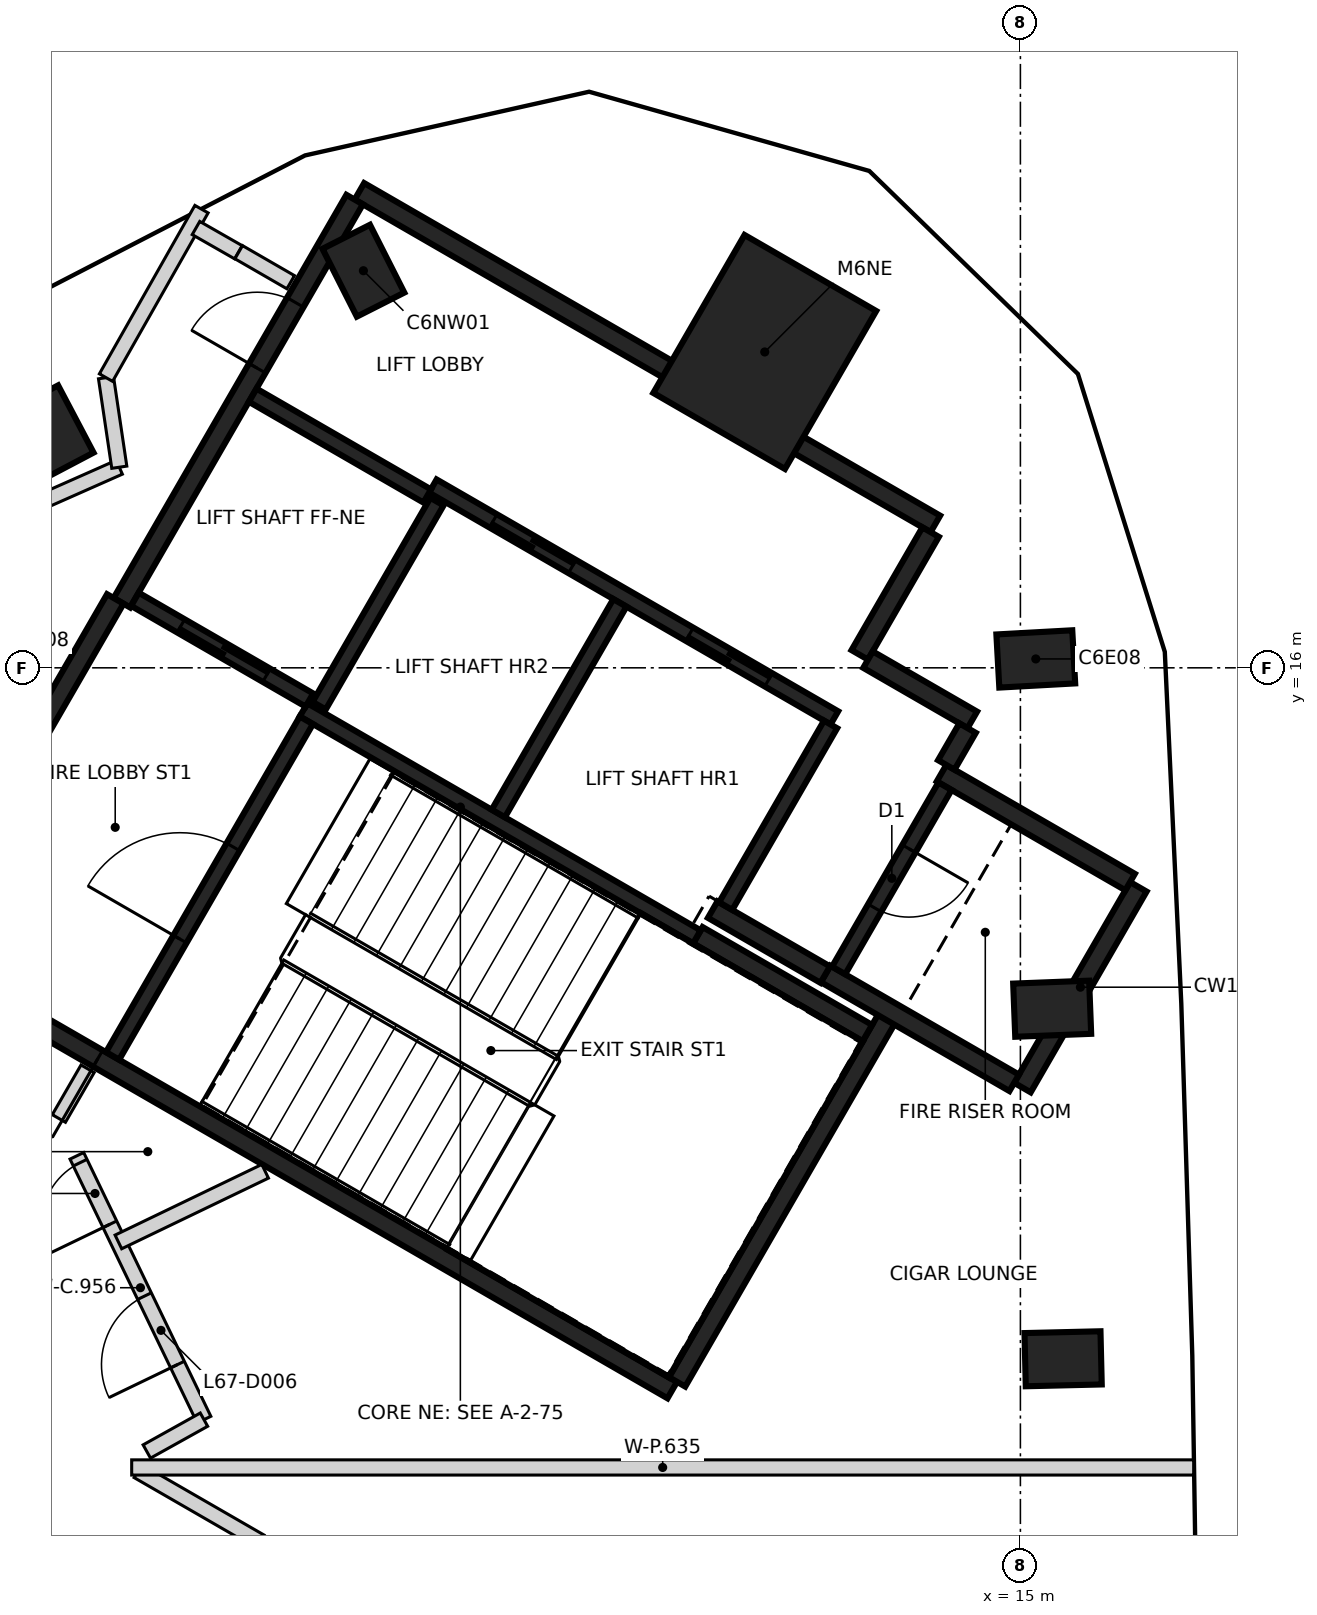
"""IFC4 building model, lengths in metres.
Left out: names, types, materials, properties, quantities, classifications, styles, units other than length and angle.
Written with IfcOpenShell. Run it as: python <this file> out.ifc"""

import sys

from ifc_helpers import new_model, si_unit, direction, frame, frame_2d, origin, origin_2d, place, context, subcontext, project, spatial, rectangle, extrude, element, fill, save


model = new_model("IFC4")
c1 = context("Model", 3, precision=1e-05, world=origin(), true_north=direction((0.0, 1.0)))
c2 = subcontext(c1, "Body", "Model", "MODEL_VIEW")
j1 = project(units=[si_unit("LENGTHUNIT", "METRE"), si_unit("PLANEANGLEUNIT", "RADIAN")], contexts=[c1])
p1 = place(None, origin())
s1 = spatial("IfcSite", under=j1, at=p1, CompositionType="ELEMENT")
p2 = place(p1, origin())
s2 = spatial("IfcBuilding", under=s1, at=p2, CompositionType="ELEMENT")
p3 = place(p2, frame((0.0, 0.0, 265.8)))
s3 = spatial("IfcBuildingStorey", under=s2, at=p3, CompositionType="ELEMENT", Elevation=265.8)
for number, where, z_axis, x_axis in (
    (1, (15.562, 6.91, -0.35), (0.0, 0.0, 1.0), (1.0, 0.024, 0.0)),
    (2, (15.418, 11.515, -0.35), (0.0, 0.0, 1.0), (0.999, 0.039, 0.0)),
    (3, (15.202, 16.117, -0.35), (0.0, 0.0, 1.0), (0.998, 0.055, 0.0)),
    (4, (6.356, 21.224, -0.35), (0.0, 0.0, 1.0), (-0.452, 0.892, 0.0)),
    (5, (2.263, 19.11, -0.35), (0.0, 0.0, 1.0), (-0.466, 0.885, 0.0)),
):
    element("IfcColumn", number, at=place(p3, frame(where, z_axis=z_axis, x_axis=x_axis)), inside=s3, PredefinedType="COLUMN", context=c2, shape_type="SweptSolid", body=[
        extrude(rectangle(XDim=1.0, YDim=0.7, at=origin_2d()), origin(), (0.0, 0.0, 1.0), 3.6),
    ])
p4 = place(p3, frame((11.637, 20.155, -0.35), z_axis=(0.0, 0.0, 1.0), x_axis=(0.5, 0.866025403784, 0.0)))
e6 = element("IfcColumn", 6, at=p4, inside=s3, PredefinedType="COLUMN", context=c2, shape_type="SweptSolid", body=[
    extrude(rectangle(XDim=2.4, YDim=2.0, at=origin_2d()), origin(), (0.0, 0.0, 1.0), 3.6),
])
p5 = place(p3, frame((10.42, 6.498, 0.0), z_axis=(0.0, 0.0, 1.0), x_axis=(-0.866021906294, 0.500006057782, 0.0)))
e7 = element("IfcWall", 7, at=p5, inside=s3, PredefinedType="SHEAR", context=c2, shape_type="SweptSolid", body=[
    extrude(rectangle(XDim=11.55, YDim=0.25, at=frame_2d((5.775, 0.0))), origin(), (0.0, 0.0, 1.0), 3.25),
])
p6 = place(p5, frame((10.025, 0.0, 0.0)))
e8 = element("IfcOpeningElement", 8, at=p6, cuts=e7, PredefinedType="OPENING", context=c2, shape_type="SweptSolid", body=[
    extrude(rectangle(XDim=1.2, YDim=2.1, at=frame_2d((0.6, 1.05))), frame((0.0, 0.135, 0.0), z_axis=(0.0, -1.0, 0.0), x_axis=(1.0, 0.0, 0.0)), (0.0, 0.0, 1.0), 0.27),
])
p7 = place(p5, frame((8.725, 0.0, 0.0)))
e9 = element("IfcOpeningElement", 9, at=p7, cuts=e7, PredefinedType="OPENING", context=c2, shape_type="SweptSolid", body=[
    extrude(rectangle(XDim=1.2, YDim=2.1, at=frame_2d((0.6, 1.05))), frame((0.0, 0.135, 0.0), z_axis=(0.0, -1.0, 0.0), x_axis=(1.0, 0.0, 0.0)), (0.0, 0.0, 1.0), 0.27),
])
p8 = place(p3, frame((6.304, 22.269, 0.0), z_axis=(0.0, 0.0, 1.0), x_axis=(0.866022959057, -0.500004234368, 0.0)))
e10 = element("IfcWall", 10, at=p8, inside=s3, PredefinedType="SHEAR", context=c2, shape_type="SweptSolid", body=[
    extrude(rectangle(XDim=8.75, YDim=0.25, at=frame_2d((4.375, 0.0))), origin(), (0.0, 0.0, 1.0), 3.25),
])
p9 = place(p3, frame((3.179, 16.856, 0.0), z_axis=(0.0, 0.0, 1.0), x_axis=(0.500001955336, 0.866024274868, 0.0)))
e11 = element("IfcWall", 11, at=p9, inside=s3, PredefinedType="SHEAR", context=c2, shape_type="SweptSolid", body=[
    extrude(rectangle(XDim=6.125, YDim=0.25, at=frame_2d((3.062, 0.0))), origin(), (0.0, 0.0, 1.0), 3.25),
])
p10 = place(p9, frame((3.563, 0.0, 0.0)))
e12 = element("IfcOpeningElement", 12, at=p10, cuts=e11, PredefinedType="OPENING", context=c2, shape_type="SweptSolid", body=[
    extrude(rectangle(XDim=1.0, YDim=2.1, at=frame_2d((0.5, 1.05))), frame((0.0, 0.135, 0.0), z_axis=(0.0, -1.0, 0.0), x_axis=(1.0, 0.0, 0.0)), (0.0, 0.0, 1.0), 0.27),
])
p11 = place(p3, frame((0.48, 12.381, 0.0), z_axis=(0.0, 0.0, 1.0), x_axis=(0.49999885962, 0.866026062182, 0.0)))
e13 = element("IfcWall", 13, at=p11, inside=s3, PredefinedType="SHEAR", context=c2, shape_type="SweptSolid", body=[
    extrude(rectangle(XDim=5.225, YDim=0.25, at=frame_2d((2.612, 0.0))), origin(), (0.0, 0.0, 1.0), 3.25),
])
p12 = place(p3, frame((13.238, 11.378, 0.0), z_axis=(0.0, 0.0, 1.0), x_axis=(-0.500008851346, -0.866020293397, 0.0)))
e14 = element("IfcWall", 14, at=p12, inside=s3, PredefinedType="SHEAR", context=c2, shape_type="SweptSolid", body=[
    extrude(rectangle(XDim=5.51, YDim=0.25, at=frame_2d((2.755, 0.0))), origin(), (0.0, 0.0, 1.0), 3.25),
])
p13 = place(p3, frame((16.552, 13.119, 0.0), z_axis=(0.0, 0.0, 1.0), x_axis=(-0.499978833458, -0.866037623948, 0.0)))
e15 = element("IfcWall", 15, at=p13, inside=s3, PredefinedType="SHEAR", context=c2, shape_type="SweptSolid", body=[
    extrude(rectangle(XDim=3.05, YDim=0.25, at=frame_2d((1.525, 0.0))), origin(), (0.0, 0.0, 1.0), 3.25),
])
p14 = place(p3, frame((14.918, 10.54, 0.0), z_axis=(0.0, 0.0, 1.0), x_axis=(-0.866063538972, 0.499933942099, 0.0)))
e16 = element("IfcWall", 16, at=p14, inside=s3, PredefinedType="SHEAR", context=c2, shape_type="SweptSolid", body=[
    extrude(rectangle(XDim=2.865, YDim=0.25, at=frame_2d((1.432, 0.0))), origin(), (0.0, 0.0, 1.0), 3.25),
])
p15 = place(p3, frame((13.963, 14.614, 0.0), z_axis=(0.0, 0.0, 1.0), x_axis=(0.866042235819, -0.499970844928, 0.0)))
e17 = element("IfcWall", 17, at=p15, inside=s3, PredefinedType="SHEAR", context=c2, shape_type="SweptSolid", body=[
    extrude(rectangle(XDim=2.865, YDim=0.25, at=frame_2d((1.432, 0.0))), origin(), (0.0, 0.0, 1.0), 3.25),
])
p16 = place(p3, frame((10.757, 12.481, 0.0), z_axis=(0.0, 0.0, 1.0), x_axis=(0.866022940537, -0.500004266446, 0.0)))
e18 = element("IfcWall", 18, at=p16, inside=s3, PredefinedType="SHEAR", context=c2, shape_type="SweptSolid", body=[
    extrude(rectangle(XDim=2.575, YDim=0.25, at=frame_2d((1.287, 0.0))), origin(), (0.0, 0.0, 1.0), 3.25),
])
p17 = place(p3, frame((13.819, 17.785, 0.0), z_axis=(0.0, 0.0, 1.0), x_axis=(-0.500039802285, -0.866002422705, 0.0)))
e19 = element("IfcWall", 19, at=p17, inside=s3, PredefinedType="SHEAR", context=c2, shape_type="SweptSolid", body=[
    extrude(rectangle(XDim=1.865, YDim=0.25, at=frame_2d((0.932, 0.0))), origin(), (0.0, 0.0, 1.0), 3.25),
])
p18 = place(p3, frame((12.433, 11.964, 0.0), z_axis=(0.0, 0.0, 1.0), x_axis=(-0.866038183914, 0.499977863513, 0.0)))
e20 = element("IfcWall", 20, at=p18, inside=s3, PredefinedType="SHEAR", context=c2, shape_type="SweptSolid", body=[
    extrude(rectangle(XDim=1.71, YDim=0.25, at=frame_2d((0.855, 0.0))), origin(), (0.0, 0.0, 1.0), 3.25),
])
p19 = place(p3, frame((12.995, 16.108, 0.0), z_axis=(0.0, 0.0, 1.0), x_axis=(0.866044474677, -0.49996696679, 0.0)))
e21 = element("IfcWall", 21, at=p19, inside=s3, PredefinedType="SHEAR", context=c2, shape_type="SweptSolid", body=[
    extrude(rectangle(XDim=1.584, YDim=0.25, at=frame_2d((0.792, 0.0))), origin(), (0.0, 0.0, 1.0), 3.25),
])
p20 = place(p3, frame((14.305, 15.207, 0.0), z_axis=(0.0, 0.0, 1.0), x_axis=(-0.499848422343, -0.866112899501, 0.0)))
e22 = element("IfcWall", 22, at=p20, inside=s3, PredefinedType="SHEAR", context=c2, shape_type="SweptSolid", body=[
    extrude(rectangle(XDim=0.559, YDim=0.25, at=frame_2d((0.28, 0.0))), origin(), (0.0, 0.0, 1.0), 3.25),
])
p21 = place(p3, frame((12.552, 15.342, 0.0), z_axis=(0.0, 0.0, 1.0), x_axis=(-0.866030299012, 0.499991521122, 0.0)))
e23 = element("IfcWall", 23, at=p21, inside=s3, PredefinedType="SHEAR", context=c2, shape_type="SweptSolid", body=[
    extrude(rectangle(XDim=6.1, YDim=0.2, at=frame_2d((3.05, 0.0))), origin(), (0.0, 0.0, 1.0), 3.25),
])
p22 = place(p21, frame((1.0, 0.0, 0.0)))
e24 = element("IfcOpeningElement", 24, at=p22, cuts=e23, PredefinedType="OPENING", context=c2, shape_type="SweptSolid", body=[
    extrude(rectangle(XDim=1.2, YDim=2.1, at=frame_2d((0.6, 1.05))), frame((0.0, 0.11, 0.0), z_axis=(0.0, -1.0, 0.0), x_axis=(1.0, 0.0, 0.0)), (0.0, 0.0, 1.0), 0.22),
])
p23 = place(p21, frame((3.982, 0.0, 0.0)))
e25 = element("IfcOpeningElement", 25, at=p23, cuts=e23, PredefinedType="OPENING", context=c2, shape_type="SweptSolid", body=[
    extrude(rectangle(XDim=1.2, YDim=2.1, at=frame_2d((0.6, 1.05))), frame((0.0, 0.11, 0.0), z_axis=(0.0, -1.0, 0.0), x_axis=(1.0, 0.0, 0.0)), (0.0, 0.0, 1.0), 0.22),
])
p24 = place(p3, frame((10.743, 12.46, 0.0), z_axis=(0.0, 0.0, 1.0), x_axis=(-0.866018848283, 0.500011354289, 0.0)))
e26 = element("IfcWall", 26, at=p24, inside=s3, PredefinedType="SHEAR", context=c2, shape_type="SweptSolid", body=[
    extrude(rectangle(XDim=5.974, YDim=0.2, at=frame_2d((2.987, 0.0))), origin(), (0.0, 0.0, 1.0), 3.25),
])
p25 = place(p3, frame((3.057, 10.895, 0.0), z_axis=(0.0, 0.0, 1.0), x_axis=(0.500027839223, 0.866009330205, 0.0)))
e27 = element("IfcWall", 27, at=p25, inside=s3, PredefinedType="SHEAR", context=c2, shape_type="SweptSolid", body=[
    extrude(rectangle(XDim=5.098, YDim=0.2, at=frame_2d((2.549, 0.0))), origin(), (0.0, 0.0, 1.0), 3.25),
])
p26 = place(p25, frame((1.774, 0.0, 0.0)))
e28 = element("IfcOpeningElement", 28, at=p26, cuts=e27, PredefinedType="OPENING", context=c2, shape_type="SweptSolid", body=[
    extrude(rectangle(XDim=1.4, YDim=2.1, at=frame_2d((0.7, 1.05))), frame((0.0, 0.11, 0.0), z_axis=(0.0, -1.0, 0.0), x_axis=(1.0, 0.0, 0.0)), (0.0, 0.0, 1.0), 0.22),
])
p27 = place(p3, frame((8.132, 14.084, 0.0), z_axis=(0.0, 0.0, 1.0), x_axis=(0.500030834389, 0.86600760081, 0.0)))
e29 = element("IfcWall", 29, at=p27, inside=s3, PredefinedType="SHEAR", context=c2, shape_type="SweptSolid", body=[
    extrude(rectangle(XDim=3.198, YDim=0.2, at=frame_2d((1.599, 0.0))), origin(), (0.0, 0.0, 1.0), 3.25),
])
p28 = place(p3, frame((14.008, 14.442, 0.0), z_axis=(0.0, 0.0, 1.0), x_axis=(-0.499986818241, -0.866033014143, 0.0)))
e30 = element("IfcWall", 30, at=p28, inside=s3, PredefinedType="SHEAR", context=c2, shape_type="SweptSolid", body=[
    extrude(rectangle(XDim=2.798, YDim=0.2, at=frame_2d((1.399, 0.0))), origin(), (0.0, 0.0, 1.0), 3.25),
])
p29 = place(p28, frame((0.949, 0.0, 0.0)))
e31 = element("IfcOpeningElement", 31, at=p29, cuts=e30, PredefinedType="OPENING", context=c2, shape_type="SweptSolid", body=[
    extrude(rectangle(XDim=0.9, YDim=2.1, at=frame_2d((0.45, 1.05))), frame((0.0, 0.11, 0.0), z_axis=(0.0, -1.0, 0.0), x_axis=(1.0, 0.0, 0.0)), (0.0, 0.0, 1.0), 0.22),
])
p30 = place(p3, frame((12.502, 15.255, 0.0), z_axis=(0.0, 0.0, 1.0), x_axis=(-0.499965018551, -0.866045599391, 0.0)))
e32 = element("IfcWall", 32, at=p30, inside=s3, PredefinedType="SHEAR", context=c2, shape_type="SweptSolid", body=[
    extrude(rectangle(XDim=2.759, YDim=0.2, at=frame_2d((1.379, 0.0))), origin(), (0.0, 0.0, 1.0), 3.25),
])
p31 = place(p3, frame((7.324, 18.187, 0.0), z_axis=(0.0, 0.0, 1.0), x_axis=(-0.499967891604, -0.866043940782, 0.0)))
e33 = element("IfcWall", 33, at=p31, inside=s3, PredefinedType="SHEAR", context=c2, shape_type="SweptSolid", body=[
    extrude(rectangle(XDim=3.1, YDim=0.2, at=frame_2d((1.55, 0.0))), origin(), (0.0, 0.0, 1.0), 3.25),
])
p32 = place(p3, frame((5.646, 15.576, 0.0), z_axis=(0.0, 0.0, 1.0), x_axis=(-0.866018407898, 0.500012117035, 0.0)))
e34 = element("IfcWall", 34, at=p32, inside=s3, PredefinedType="SHEAR", context=c2, shape_type="SweptSolid", body=[
    extrude(rectangle(XDim=2.651, YDim=0.2, at=frame_2d((1.325, 0.0))), origin(), (0.0, 0.0, 1.0), 3.25),
])
p33 = place(p32, frame((0.652, 0.0, 0.0)))
e35 = element("IfcOpeningElement", 35, at=p33, cuts=e34, PredefinedType="OPENING", context=c2, shape_type="SweptSolid", body=[
    extrude(rectangle(XDim=1.3, YDim=2.1, at=frame_2d((0.65, 1.05))), frame((0.0, 0.11, 0.0), z_axis=(0.0, -1.0, 0.0), x_axis=(1.0, 0.0, 0.0)), (0.0, 0.0, 1.0), 0.22),
])
p34 = place(p3, frame((7.196, 18.26, 0.0), z_axis=(0.0, 0.0, 1.0), x_axis=(-0.866018407898, 0.500012117035, 0.0)))
e36 = element("IfcWall", 36, at=p34, inside=s3, PredefinedType="SHEAR", context=c2, shape_type="SweptSolid", body=[
    extrude(rectangle(XDim=2.651, YDim=0.2, at=frame_2d((1.325, 0.0))), origin(), (0.0, 0.0, 1.0), 3.25),
])
p35 = place(p3, frame((2.021, 18.141, 0.0), z_axis=(0.0, 0.0, 1.0), x_axis=(0.914343087003, 0.404940389748, 0.0)))
e37 = element("IfcWall", 37, at=p35, inside=s3, PredefinedType="PARTITIONING", context=c2, shape_type="SweptSolid", body=[
    extrude(rectangle(XDim=1.229, YDim=0.2, at=frame_2d((0.615, 0.0))), origin(), (0.0, 0.0, 1.0), 3.25),
])
p36 = place(p3, frame((2.35, 10.071, 0.0), z_axis=(0.0, 0.0, 1.0), x_axis=(0.500309905322, 0.865846405916, 0.0)))
e38 = element("IfcWall", 38, at=p36, inside=s3, PredefinedType="PARTITIONING", context=c2, shape_type="SweptSolid", body=[
    extrude(rectangle(XDim=0.755, YDim=0.2, at=frame_2d((0.378, 0.0))), origin(), (0.0, 0.0, 1.0), 3.25),
])
p37 = place(p3, frame((4.26, 6.109, 0.0), z_axis=(0.0, 0.0, 1.0), x_axis=(-0.434189007872, 0.900821794498, 0.0)))
e39 = element("IfcWall", 39, at=p37, inside=s3, PredefinedType="PARTITIONING", context=c2, shape_type="SweptSolid", body=[
    extrude(rectangle(XDim=3.853, YDim=0.2, at=frame_2d((1.926, 0.0))), origin(), (0.0, 0.0, 1.0), 3.25),
])
p38 = place(p37, frame((2.853, 0.0, 0.0)))
e40 = element("IfcOpeningElement", 40, at=p38, cuts=e39, PredefinedType="OPENING", context=c2, shape_type="SweptSolid", body=[
    extrude(rectangle(XDim=0.9, YDim=2.1, at=frame_2d((0.45, 1.05))), frame((0.0, 0.11, 0.0), z_axis=(0.0, -1.0, 0.0), x_axis=(1.0, 0.0, 0.0)), (0.0, 0.0, 1.0), 0.22),
])
p39 = place(p37, frame((0.804, 0.0, 0.0)))
e41 = element("IfcOpeningElement", 41, at=p39, cuts=e39, PredefinedType="OPENING", context=c2, shape_type="SweptSolid", body=[
    extrude(rectangle(XDim=1.0, YDim=2.1, at=frame_2d((0.5, 1.05))), frame((0.0, 0.11, 0.0), z_axis=(0.0, -1.0, 0.0), x_axis=(1.0, 0.0, 0.0)), (0.0, 0.0, 1.0), 0.22),
])
p40 = place(p3, frame((2.97, 19.817, 0.0), z_axis=(0.0, 0.0, 1.0), x_axis=(0.146986994932, -0.989138424752, 0.0)))
e42 = element("IfcWall", 42, at=p40, inside=s3, PredefinedType="PARTITIONING", context=c2, shape_type="SweptSolid", body=[
    extrude(rectangle(XDim=1.191, YDim=0.2, at=frame_2d((0.595, 0.0))), origin(), (0.0, 0.0, 1.0), 2.35),
])
p41 = place(p3, frame((2.97, 19.818, 0.0), z_axis=(0.0, 0.0, 1.0), x_axis=(0.493215654548, 0.86990707441, 0.0)))
e43 = element("IfcWall", 43, at=p41, inside=s3, PredefinedType="PARTITIONING", context=c2, shape_type="SweptSolid", body=[
    extrude(rectangle(XDim=2.548, YDim=0.2, at=frame_2d((1.274, 0.0))), origin(), (0.0, 0.0, 1.0), 3.25),
])
p42 = place(p3, frame((3.39, 5.433, 0.0), z_axis=(0.0, 0.0, 1.0), x_axis=(0.866117799835, -0.499839931186, 0.0)))
e44 = element("IfcWall", 44, at=p42, inside=s3, PredefinedType="PARTITIONING", context=c2, shape_type="SweptSolid", body=[
    extrude(rectangle(XDim=1.859, YDim=0.2, at=frame_2d((0.929, 0.0))), origin(), (0.0, 0.0, 1.0), 3.25),
])
p43 = place(p3, frame((3.507, 5.69, 0.0), z_axis=(0.0, 0.0, 1.0), x_axis=(0.873567976284, 0.486702158215, 0.0)))
e45 = element("IfcWall", 45, at=p43, inside=s3, PredefinedType="PARTITIONING", context=c2, shape_type="SweptSolid", body=[
    extrude(rectangle(XDim=0.861, YDim=0.2, at=frame_2d((0.43, 0.0))), origin(), (0.0, 0.0, 1.0), 3.25),
])
p44 = place(p3, frame((4.154, 21.786, 0.0), z_axis=(0.0, 0.0, 1.0), x_axis=(0.868196374619, -0.496220772539, 0.0)))
e46 = element("IfcWall", 46, at=p44, inside=s3, PredefinedType="PARTITIONING", context=c2, shape_type="SweptSolid", body=[
    extrude(rectangle(XDim=0.643, YDim=0.2, at=frame_2d((0.321, 0.0))), origin(), (0.0, 0.0, 1.0), 3.25),
])
p45 = place(p3, frame((4.716, 21.468, 0.0), z_axis=(0.0, 0.0, 1.0), x_axis=(0.865912682783, -0.500195187698, 0.0)))
e47 = element("IfcWall", 47, at=p45, inside=s3, PredefinedType="PARTITIONING", context=c2, shape_type="SweptSolid", body=[
    extrude(rectangle(XDim=0.79, YDim=0.2, at=frame_2d((0.395, 0.0))), origin(), (0.0, 0.0, 1.0), 3.25),
])
p46 = place(p3, frame((3.133, 8.447, 0.0), z_axis=(0.0, 0.0, 1.0), x_axis=(0.900981876458, 0.433856725538, 0.0)))
e48 = element("IfcWall", 48, at=p46, inside=s3, PredefinedType="PARTITIONING", context=c2, shape_type="SweptSolid", body=[
    extrude(rectangle(XDim=2.143, YDim=0.2, at=frame_2d((1.071, 0.0))), origin(), (0.0, 0.0, 1.0), 3.25),
])
p47 = place(p3, frame((3.308, 5.48, 0.0), z_axis=(0.0, 0.0, 1.0), x_axis=(1.0, 0.0, 0.0)))
e49 = element("IfcWall", 49, at=p47, inside=s3, PredefinedType="PARTITIONING", context=c2, shape_type="SweptSolid", body=[
    extrude(rectangle(XDim=13.971, YDim=0.2, at=frame_2d((6.986, 0.0))), origin(), (0.0, 0.0, 1.0), 2.35),
])
p48 = place(p33, origin())
e50 = element("IfcDoor", 50, at=p48, inside=s3, OperationType="SLIDING_TO_RIGHT", PredefinedType="DOOR", context=c2, shape_type="SweptSolid", body=[
    extrude(rectangle(XDim=1.3, YDim=2.1, at=frame_2d((0.65, 1.05))), frame((0.0, 0.025, 0.0), z_axis=(0.0, -1.0, 0.0), x_axis=(1.0, 0.0, 0.0)), (0.0, 0.0, 1.0), 0.05),
])
fill(e35, e50)
p49 = place(p22, origin())
e51 = element("IfcDoor", 51, at=p49, inside=s3, OperationType="DOUBLE_DOOR_SLIDING", PredefinedType="DOOR", context=c2, shape_type="SweptSolid", body=[
    extrude(rectangle(XDim=1.2, YDim=2.1, at=frame_2d((0.6, 1.05))), frame((0.0, 0.025, 0.0), z_axis=(0.0, -1.0, 0.0), x_axis=(1.0, 0.0, 0.0)), (0.0, 0.0, 1.0), 0.05),
])
fill(e24, e51)
p50 = place(p23, origin())
e52 = element("IfcDoor", 52, at=p50, inside=s3, OperationType="DOUBLE_DOOR_SLIDING", PredefinedType="DOOR", context=c2, shape_type="SweptSolid", body=[
    extrude(rectangle(XDim=1.2, YDim=2.1, at=frame_2d((0.6, 1.05))), frame((0.0, 0.025, 0.0), z_axis=(0.0, -1.0, 0.0), x_axis=(1.0, 0.0, 0.0)), (0.0, 0.0, 1.0), 0.05),
])
fill(e25, e52)
p51 = place(p10, origin())
e53 = element("IfcDoor", 53, at=p51, inside=s3, OperationType="SINGLE_SWING_LEFT", PredefinedType="DOOR", context=c2, shape_type="SweptSolid", body=[
    extrude(rectangle(XDim=1.0, YDim=2.1, at=frame_2d((0.5, 1.05))), frame((0.0, 0.025, 0.0), z_axis=(0.0, -1.0, 0.0), x_axis=(1.0, 0.0, 0.0)), (0.0, 0.0, 1.0), 0.05),
])
fill(e12, e53)
p52 = place(p7, origin())
e54 = element("IfcDoor", 54, at=p52, inside=s3, OperationType="SINGLE_SWING_RIGHT", PredefinedType="DOOR", context=c2, shape_type="SweptSolid", body=[
    extrude(rectangle(XDim=1.2, YDim=2.1, at=frame_2d((0.6, 1.05))), frame((0.0, 0.025, 0.0), z_axis=(0.0, -1.0, 0.0), x_axis=(1.0, 0.0, 0.0)), (0.0, 0.0, 1.0), 0.05),
])
fill(e9, e54)
p53 = place(p26, origin())
e55 = element("IfcDoor", 55, at=p53, inside=s3, OperationType="SINGLE_SWING_RIGHT", PredefinedType="DOOR", context=c2, shape_type="SweptSolid", body=[
    extrude(rectangle(XDim=1.4, YDim=2.1, at=frame_2d((0.7, 1.05))), frame((0.0, 0.025, 0.0), z_axis=(0.0, -1.0, 0.0), x_axis=(1.0, 0.0, 0.0)), (0.0, 0.0, 1.0), 0.05),
])
fill(e28, e55)
p54 = place(p29, origin())
e56 = element("IfcDoor", 56, at=p54, inside=s3, OperationType="SINGLE_SWING_LEFT", PredefinedType="DOOR", context=c2, shape_type="SweptSolid", body=[
    extrude(rectangle(XDim=0.9, YDim=2.1, at=frame_2d((0.45, 1.05))), frame((0.0, 0.025, 0.0), z_axis=(0.0, -1.0, 0.0), x_axis=(1.0, 0.0, 0.0)), (0.0, 0.0, 1.0), 0.05),
])
fill(e31, e56)
p55 = place(p38, origin())
e57 = element("IfcDoor", 57, at=p55, inside=s3, OperationType="SINGLE_SWING_LEFT", PredefinedType="DOOR", context=c2, shape_type="SweptSolid", body=[
    extrude(rectangle(XDim=0.9, YDim=2.1, at=frame_2d((0.45, 1.05))), frame((0.0, 0.025, 0.0), z_axis=(0.0, -1.0, 0.0), x_axis=(1.0, 0.0, 0.0)), (0.0, 0.0, 1.0), 0.05),
])
fill(e40, e57)
p56 = place(p39, origin())
e58 = element("IfcDoor", 58, at=p56, inside=s3, OperationType="SINGLE_SWING_LEFT", PredefinedType="DOOR", context=c2, shape_type="SweptSolid", body=[
    extrude(rectangle(XDim=1.0, YDim=2.1, at=frame_2d((0.5, 1.05))), frame((0.0, 0.025, 0.0), z_axis=(0.0, -1.0, 0.0), x_axis=(1.0, 0.0, 0.0)), (0.0, 0.0, 1.0), 0.05),
])
fill(e41, e58)
save(model, sys.argv[1])
